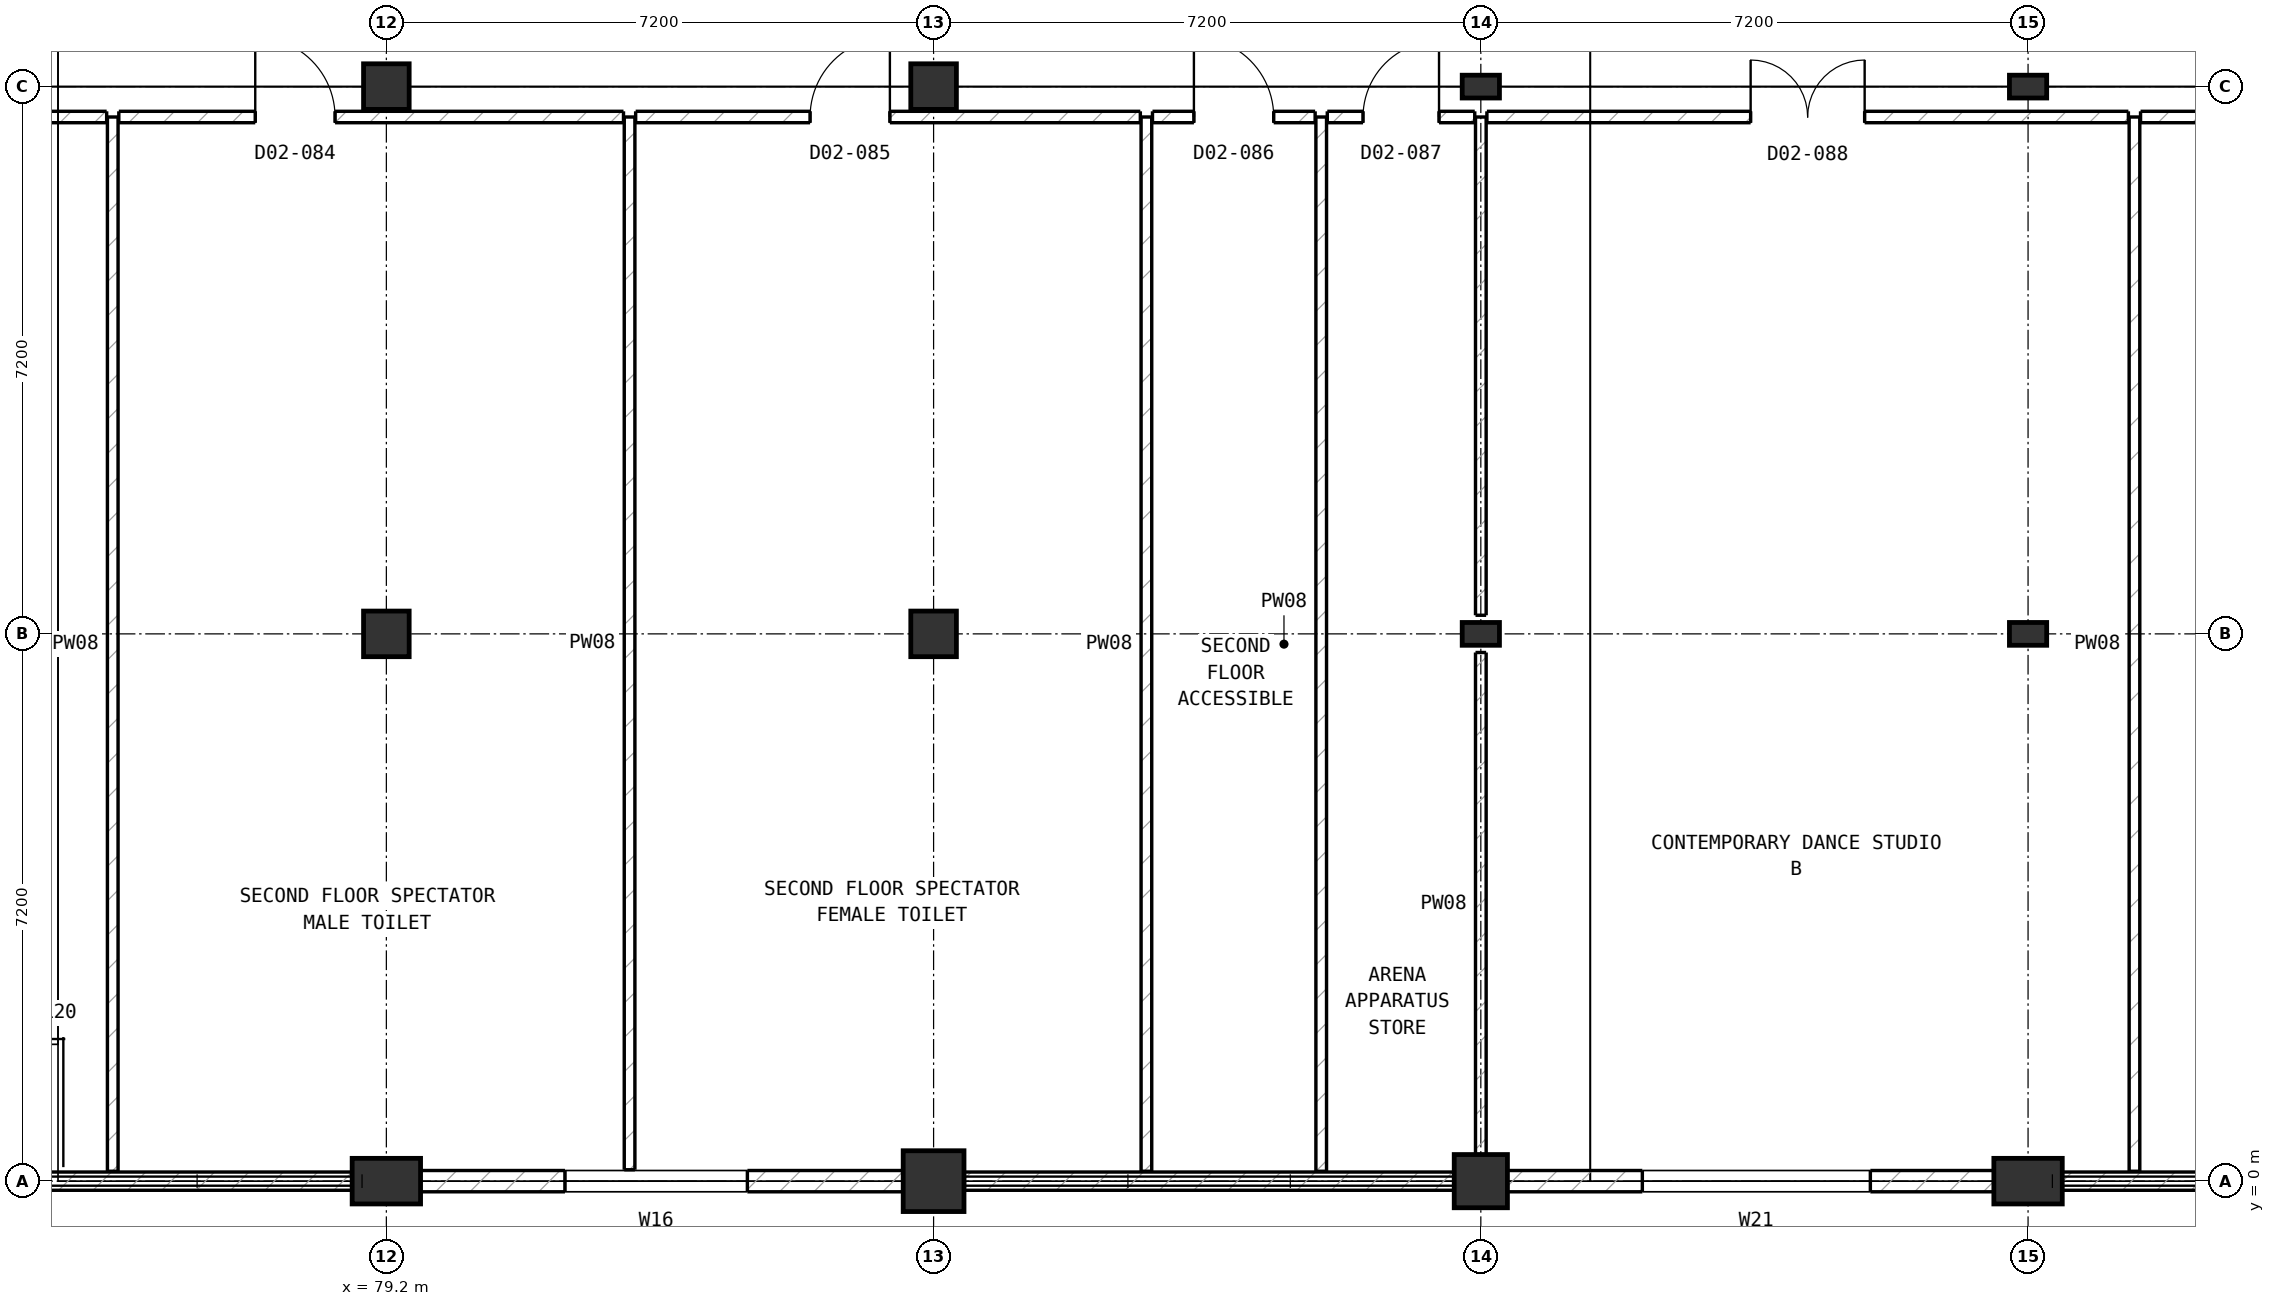
"""IFC4 building model, lengths in metres.
Left out: names, types, materials, properties, quantities, classifications, styles, units other than length and angle.
Written with IfcOpenShell. Run it as: python <this file> out.ifc"""

import sys

from ifc_helpers import new_model, si_unit, direction, frame, frame_2d, origin, origin_2d, place, context, subcontext, project, spatial, rectangle, i_section, extrude, element, fill, save


model = new_model("IFC4")
c1 = context("Model", 3, precision=1e-05, world=origin(), true_north=direction((0.0, 1.0)))
c2 = subcontext(c1, "Body", "Model", "MODEL_VIEW")
j1 = project(units=[si_unit("LENGTHUNIT", "METRE"), si_unit("PLANEANGLEUNIT", "RADIAN")], contexts=[c1])
p1 = place(None, origin())
s1 = spatial("IfcSite", under=j1, at=p1, CompositionType="ELEMENT")
p2 = place(p1, origin())
s2 = spatial("IfcBuilding", under=s1, at=p2, CompositionType="ELEMENT")
p3 = place(p2, frame((0.0, 0.0, 11.2)))
s3 = spatial("IfcBuildingStorey", under=s2, at=p3, CompositionType="ELEMENT", Elevation=11.2)
p4 = place(p3, frame((79.2, 0.0, 0.0), z_axis=(0.0, 0.0, 1.0), x_axis=(1.0, 0.0, 0.0)))
e1 = element("IfcColumn", 1, at=p4, inside=s3, PredefinedType="COLUMN", context=c2, shape_type="SweptSolid", body=[
    extrude(rectangle(XDim=0.6, YDim=0.9, at=origin_2d()), origin(), (0.0, 0.0, 1.0), 4.8),
])
for number, where, z_axis, x_axis in (
    (2, (79.2, 7.2, 0.0), (0.0, 0.0, 1.0), (1.0, 0.0, 0.0)),
    (3, (79.2, 14.4, 0.0), (0.0, 0.0, 1.0), (1.0, 0.0, 0.0)),
):
    element("IfcColumn", number, at=place(p3, frame(where, z_axis=z_axis, x_axis=x_axis)), inside=s3, PredefinedType="COLUMN", context=c2, shape_type="SweptSolid", body=[
        extrude(rectangle(XDim=0.6, YDim=0.6, at=origin_2d()), origin(), (0.0, 0.0, 1.0), 4.8),
    ])
p5 = place(p3, frame((86.4, 0.0, 0.0), z_axis=(0.0, 0.0, 1.0), x_axis=(1.0, 0.0, 0.0)))
e4 = element("IfcColumn", 4, at=p5, inside=s3, PredefinedType="COLUMN", context=c2, shape_type="SweptSolid", body=[
    extrude(rectangle(XDim=0.8, YDim=0.8, at=origin_2d()), origin(), (0.0, 0.0, 1.0), 4.8),
])
for number, where, z_axis, x_axis in (
    (5, (86.4, 7.2, 0.0), (0.0, 0.0, 1.0), (1.0, 0.0, 0.0)),
    (6, (86.4, 14.4, 0.0), (0.0, 0.0, 1.0), (1.0, 0.0, 0.0)),
):
    element("IfcColumn", number, at=place(p3, frame(where, z_axis=z_axis, x_axis=x_axis)), inside=s3, PredefinedType="COLUMN", context=c2, shape_type="SweptSolid", body=[
        extrude(rectangle(XDim=0.6, YDim=0.6, at=origin_2d()), origin(), (0.0, 0.0, 1.0), 4.8),
    ])
p6 = place(p3, frame((93.6, 0.0, 0.0), z_axis=(0.0, 0.0, 1.0), x_axis=(1.0, 0.0, 0.0)))
e7 = element("IfcColumn", 7, at=p6, inside=s3, PredefinedType="COLUMN", context=c2, shape_type="SweptSolid", body=[
    extrude(rectangle(XDim=0.7, YDim=0.7, at=origin_2d()), origin(), (0.0, 0.0, 1.0), 4.8),
])
for number, where, z_axis, x_axis in (
    (8, (93.6, 7.2, 0.0), (0.0, 0.0, 1.0), (1.0, 0.0, 0.0)),
    (9, (93.6, 14.4, 0.0), (0.0, 0.0, 1.0), (1.0, 0.0, 0.0)),
):
    element("IfcColumn", number, at=place(p3, frame(where, z_axis=z_axis, x_axis=x_axis)), inside=s3, PredefinedType="COLUMN", context=c2, shape_type="SweptSolid", body=[
        extrude(i_section(OverallWidth=0.3, OverallDepth=0.49, WebThickness=0.012, FlangeThickness=0.023, at=origin_2d()), origin(), (0.0, 0.0, 1.0), 4.8),
    ])
p7 = place(p3, frame((100.8, 0.0, 0.0), z_axis=(0.0, 0.0, 1.0), x_axis=(1.0, 0.0, 0.0)))
e10 = element("IfcColumn", 10, at=p7, inside=s3, PredefinedType="COLUMN", context=c2, shape_type="SweptSolid", body=[
    extrude(rectangle(XDim=0.6, YDim=0.9, at=origin_2d()), origin(), (0.0, 0.0, 1.0), 4.8),
])
for number, where, z_axis, x_axis in (
    (11, (100.8, 7.2, 0.0), (0.0, 0.0, 1.0), (1.0, 0.0, 0.0)),
    (12, (100.8, 14.4, 0.0), (0.0, 0.0, 1.0), (1.0, 0.0, 0.0)),
):
    element("IfcColumn", number, at=place(p3, frame(where, z_axis=z_axis, x_axis=x_axis)), inside=s3, PredefinedType="COLUMN", context=c2, shape_type="SweptSolid", body=[
        extrude(i_section(OverallWidth=0.3, OverallDepth=0.49, WebThickness=0.012, FlangeThickness=0.023, at=origin_2d()), origin(), (0.0, 0.0, 1.0), 4.8),
    ])
p8 = place(p3, frame((107.615, 0.0, 0.0), z_axis=(0.0, 0.0, 1.0), x_axis=(-1.0, 0.0, 0.0)))
e13 = element("IfcWall", 13, at=p8, inside=s3, PredefinedType="SOLIDWALL", context=c2, shape_type="SweptSolid", body=[
    extrude(rectangle(XDim=6.53, YDim=0.24, at=frame_2d((3.265, 0.0))), origin(), (0.0, 0.0, 1.0), 0.35),
])
p9 = place(p3, frame((100.515, 0.0, 0.0), z_axis=(0.0, 0.0, 1.0), x_axis=(-1.0, 0.0, 0.0)))
e14 = element("IfcWall", 14, at=p9, inside=s3, PredefinedType="SOLIDWALL", context=c2, shape_type="SweptSolid", body=[
    extrude(rectangle(XDim=6.58, YDim=0.28, at=frame_2d((3.29, 0.0))), origin(), (0.0, 0.0, 1.0), 4.185),
])
p10 = place(p9, frame((1.79, 0.0, 0.9)))
e15 = element("IfcOpeningElement", 15, at=p10, cuts=e14, PredefinedType="OPENING", context=c2, shape_type="SweptSolid", body=[
    extrude(rectangle(XDim=3.0, YDim=2.1, at=frame_2d((1.5, 1.05))), frame((0.0, 0.15, 0.0), z_axis=(0.0, -1.0, 0.0), x_axis=(1.0, 0.0, 0.0)), (0.0, 0.0, 1.0), 0.3),
])
p11 = place(p3, frame((93.265, 0.0, 0.0), z_axis=(0.0, 0.0, 1.0), x_axis=(-1.0, 0.0, 0.0)))
e16 = element("IfcWall", 16, at=p11, inside=s3, PredefinedType="SOLIDWALL", context=c2, shape_type="SweptSolid", body=[
    extrude(rectangle(XDim=6.48, YDim=0.24, at=frame_2d((3.24, 0.0))), origin(), (0.0, 0.0, 1.0), 0.35),
])
p12 = place(p3, frame((86.015, 0.0, 0.0), z_axis=(0.0, 0.0, 1.0), x_axis=(-1.0, 0.0, 0.0)))
e17 = element("IfcWall", 17, at=p12, inside=s3, PredefinedType="SOLIDWALL", context=c2, shape_type="SweptSolid", body=[
    extrude(rectangle(XDim=6.53, YDim=0.28, at=frame_2d((3.265, 0.0))), origin(), (0.0, 0.0, 1.0), 4.185),
])
p13 = place(p12, frame((2.065, 0.0, 0.9)))
e18 = element("IfcOpeningElement", 18, at=p13, cuts=e17, PredefinedType="OPENING", context=c2, shape_type="SweptSolid", body=[
    extrude(rectangle(XDim=2.4, YDim=2.1, at=frame_2d((1.2, 1.05))), frame((0.0, 0.15, 0.0), z_axis=(0.0, -1.0, 0.0), x_axis=(1.0, 0.0, 0.0)), (0.0, 0.0, 1.0), 0.3),
])
p14 = place(p3, frame((78.915, 0.0, 0.0), z_axis=(0.0, 0.0, 1.0), x_axis=(-1.0, 0.0, 0.0)))
e19 = element("IfcWall", 19, at=p14, inside=s3, PredefinedType="SOLIDWALL", context=c2, shape_type="SweptSolid", body=[
    extrude(rectangle(XDim=6.58, YDim=0.24, at=frame_2d((3.29, 0.0))), origin(), (0.0, 0.0, 1.0), 0.35),
])
p15 = place(p3, frame((75.6, 0.13, 0.0), z_axis=(0.0, 0.0, 1.0), x_axis=(0.0, 1.0, 0.0)))
e20 = element("IfcWall", 20, at=p15, inside=s3, PredefinedType="PARTITIONING", context=c2, shape_type="SweptSolid", body=[
    extrude(rectangle(XDim=13.87, YDim=0.14, at=frame_2d((6.935, 0.0))), origin(), (0.0, 0.0, 1.0), 4.51),
])
p16 = place(p3, frame((82.4, 0.15, 0.0), z_axis=(0.0, 0.0, 1.0), x_axis=(0.0, 1.0, 0.0)))
e21 = element("IfcWall", 21, at=p16, inside=s3, PredefinedType="PARTITIONING", context=c2, shape_type="SweptSolid", body=[
    extrude(rectangle(XDim=13.85, YDim=0.14, at=frame_2d((6.925, 0.0))), origin(), (0.0, 0.0, 1.0), 4.51),
])
for number, where, z_axis, x_axis in (
    (22, (89.2, 0.13, 0.0), (0.0, 0.0, 1.0), (0.0, 1.0, 0.0)),
    (23, (91.5, 0.13, 0.0), (0.0, 0.0, 1.0), (0.0, 1.0, 0.0)),
):
    element("IfcWall", number, at=place(p3, frame(where, z_axis=z_axis, x_axis=x_axis)), inside=s3, PredefinedType="PARTITIONING", context=c2, shape_type="SweptSolid", body=[
        extrude(rectangle(XDim=13.87, YDim=0.14, at=frame_2d((6.935, 0.0))), origin(), (0.0, 0.0, 1.0), 4.51),
    ])
p17 = place(p3, frame((93.6, 0.35, 0.0), z_axis=(0.0, 0.0, 1.0), x_axis=(0.0, 1.0, 0.0)))
e24 = element("IfcWall", 24, at=p17, inside=s3, PredefinedType="PARTITIONING", context=c2, shape_type="SweptSolid", body=[
    extrude(rectangle(XDim=6.605, YDim=0.14, at=frame_2d((3.302, 0.0))), origin(), (0.0, 0.0, 1.0), 3.99),
])
p18 = place(p3, frame((93.6, 7.445, 0.0), z_axis=(0.0, 0.0, 1.0), x_axis=(0.0, 1.0, 0.0)))
e25 = element("IfcWall", 25, at=p18, inside=s3, PredefinedType="PARTITIONING", context=c2, shape_type="SweptSolid", body=[
    extrude(rectangle(XDim=6.555, YDim=0.14, at=frame_2d((3.277, 0.0))), origin(), (0.0, 0.0, 1.0), 3.99),
])
p19 = place(p3, frame((102.2, 0.13, 0.0), z_axis=(0.0, 0.0, 1.0), x_axis=(0.0, 1.0, 0.0)))
e26 = element("IfcWall", 26, at=p19, inside=s3, PredefinedType="PARTITIONING", context=c2, shape_type="SweptSolid", body=[
    extrude(rectangle(XDim=13.87, YDim=0.14, at=frame_2d((6.935, 0.0))), origin(), (0.0, 0.0, 1.0), 4.49),
])
p20 = place(p3, frame((64.87, 14.0, 0.0), z_axis=(0.0, 0.0, 1.0), x_axis=(1.0, 0.0, 0.0)))
e27 = element("IfcWall", 27, at=p20, inside=s3, PredefinedType="PARTITIONING", context=c2, shape_type="SweptSolid", body=[
    extrude(rectangle(XDim=10.65, YDim=0.15, at=frame_2d((5.325, 0.0))), origin(), (0.0, 0.0, 1.0), 4.51),
])
p21 = place(p20, frame((4.8, 0.0, 0.0)))
e28 = element("IfcOpeningElement", 28, at=p21, cuts=e27, PredefinedType="OPENING", context=c2, shape_type="SweptSolid", body=[
    extrude(rectangle(XDim=1.05, YDim=2.15, at=frame_2d((0.525, 1.075))), frame((0.0, 0.085, 0.0), z_axis=(0.0, -1.0, 0.0), x_axis=(1.0, 0.0, 0.0)), (0.0, 0.0, 1.0), 0.17),
])
p22 = place(p3, frame((75.68, 14.0, 0.0), z_axis=(0.0, 0.0, 1.0), x_axis=(1.0, 0.0, 0.0)))
e29 = element("IfcWall", 29, at=p22, inside=s3, PredefinedType="PARTITIONING", context=c2, shape_type="SweptSolid", body=[
    extrude(rectangle(XDim=6.64, YDim=0.15, at=frame_2d((3.32, 0.0))), origin(), (0.0, 0.0, 1.0), 4.51),
])
p23 = place(p22, frame((1.795, 0.0, 0.0)))
e30 = element("IfcOpeningElement", 30, at=p23, cuts=e29, PredefinedType="OPENING", context=c2, shape_type="SweptSolid", body=[
    extrude(rectangle(XDim=1.05, YDim=2.15, at=frame_2d((0.525, 1.075))), frame((0.0, 0.085, 0.0), z_axis=(0.0, -1.0, 0.0), x_axis=(1.0, 0.0, 0.0)), (0.0, 0.0, 1.0), 0.17),
])
p24 = place(p3, frame((82.48, 14.0, 0.0), z_axis=(0.0, 0.0, 1.0), x_axis=(1.0, 0.0, 0.0)))
e31 = element("IfcWall", 31, at=p24, inside=s3, PredefinedType="PARTITIONING", context=c2, shape_type="SweptSolid", body=[
    extrude(rectangle(XDim=6.64, YDim=0.15, at=frame_2d((3.32, 0.0))), origin(), (0.0, 0.0, 1.0), 4.51),
])
p25 = place(p24, frame((2.295, 0.0, 0.0)))
e32 = element("IfcOpeningElement", 32, at=p25, cuts=e31, PredefinedType="OPENING", context=c2, shape_type="SweptSolid", body=[
    extrude(rectangle(XDim=1.05, YDim=2.15, at=frame_2d((0.525, 1.075))), frame((0.0, 0.085, 0.0), z_axis=(0.0, -1.0, 0.0), x_axis=(1.0, 0.0, 0.0)), (0.0, 0.0, 1.0), 0.17),
])
p26 = place(p3, frame((89.28, 14.0, 0.0), z_axis=(0.0, 0.0, 1.0), x_axis=(1.0, 0.0, 0.0)))
e33 = element("IfcWall", 33, at=p26, inside=s3, PredefinedType="PARTITIONING", context=c2, shape_type="SweptSolid", body=[
    extrude(rectangle(XDim=2.14, YDim=0.15, at=frame_2d((1.07, 0.0))), origin(), (0.0, 0.0, 1.0), 4.51),
])
p27 = place(p26, frame((0.545, 0.0, 0.0)))
e34 = element("IfcOpeningElement", 34, at=p27, cuts=e33, PredefinedType="OPENING", context=c2, shape_type="SweptSolid", body=[
    extrude(rectangle(XDim=1.05, YDim=2.15, at=frame_2d((0.525, 1.075))), frame((0.0, 0.085, 0.0), z_axis=(0.0, -1.0, 0.0), x_axis=(1.0, 0.0, 0.0)), (0.0, 0.0, 1.0), 0.17),
])
p28 = place(p3, frame((91.58, 14.0, 0.0), z_axis=(0.0, 0.0, 1.0), x_axis=(1.0, 0.0, 0.0)))
e35 = element("IfcWall", 35, at=p28, inside=s3, PredefinedType="PARTITIONING", context=c2, shape_type="SweptSolid", body=[
    extrude(rectangle(XDim=1.94, YDim=0.15, at=frame_2d((0.97, 0.0))), origin(), (0.0, 0.0, 1.0), 4.51),
])
p29 = place(p28, frame((0.47, 0.0, 0.0)))
e36 = element("IfcOpeningElement", 36, at=p29, cuts=e35, PredefinedType="OPENING", context=c2, shape_type="SweptSolid", body=[
    extrude(rectangle(XDim=1.0, YDim=2.15, at=frame_2d((0.5, 1.075))), frame((0.0, 0.085, 0.0), z_axis=(0.0, -1.0, 0.0), x_axis=(1.0, 0.0, 0.0)), (0.0, 0.0, 1.0), 0.17),
])
p30 = place(p3, frame((93.68, 14.0, 0.0), z_axis=(0.0, 0.0, 1.0), x_axis=(1.0, 0.0, 0.0)))
e37 = element("IfcWall", 37, at=p30, inside=s3, PredefinedType="PARTITIONING", context=c2, shape_type="SweptSolid", body=[
    extrude(rectangle(XDim=8.44, YDim=0.15, at=frame_2d((4.22, 0.0))), origin(), (0.0, 0.0, 1.0), 4.49),
])
p31 = place(p30, frame((3.47, 0.0, 0.0)))
e38 = element("IfcOpeningElement", 38, at=p31, cuts=e37, PredefinedType="OPENING", context=c2, shape_type="SweptSolid", body=[
    extrude(rectangle(XDim=1.5, YDim=2.2, at=frame_2d((0.75, 1.1))), frame((0.0, 0.085, 0.0), z_axis=(0.0, -1.0, 0.0), x_axis=(1.0, 0.0, 0.0)), (0.0, 0.0, 1.0), 0.17),
])
p32 = place(p3, frame((102.28, 14.0, 0.0), z_axis=(0.0, 0.0, 1.0), x_axis=(1.0, 0.0, 0.0)))
e39 = element("IfcWall", 39, at=p32, inside=s3, PredefinedType="PARTITIONING", context=c2, shape_type="SweptSolid", body=[
    extrude(rectangle(XDim=6.26, YDim=0.15, at=frame_2d((3.13, 0.0))), origin(), (0.0, 0.0, 1.0), 4.49),
])
p33 = place(p32, frame((2.28, 0.0, 0.0)))
e40 = element("IfcOpeningElement", 40, at=p33, cuts=e39, PredefinedType="OPENING", context=c2, shape_type="SweptSolid", body=[
    extrude(rectangle(XDim=1.7, YDim=2.3, at=frame_2d((0.85, 1.15))), frame((0.0, 0.085, 0.0), z_axis=(0.0, -1.0, 0.0), x_axis=(1.0, 0.0, 0.0)), (0.0, 0.0, 1.0), 0.17),
])
p34 = place(p10, origin())
e41 = element("IfcWindow", 41, at=p34, inside=s3, PartitioningType="SINGLE_PANEL", PredefinedType="WINDOW", context=c2, shape_type="SweptSolid", body=[
    extrude(rectangle(XDim=3.0, YDim=2.1, at=frame_2d((1.5, 1.05))), frame((0.0, 0.03, 0.0), z_axis=(0.0, -1.0, 0.0), x_axis=(1.0, 0.0, 0.0)), (0.0, 0.0, 1.0), 0.06),
])
fill(e15, e41)
p35 = place(p13, origin())
e42 = element("IfcWindow", 42, at=p35, inside=s3, PartitioningType="SINGLE_PANEL", PredefinedType="WINDOW", context=c2, shape_type="SweptSolid", body=[
    extrude(rectangle(XDim=2.4, YDim=2.1, at=frame_2d((1.2, 1.05))), frame((0.0, 0.03, 0.0), z_axis=(0.0, -1.0, 0.0), x_axis=(1.0, 0.0, 0.0)), (0.0, 0.0, 1.0), 0.06),
])
fill(e18, e42)
p36 = place(p23, origin())
e43 = element("IfcDoor", 43, at=p36, inside=s3, OperationType="SINGLE_SWING_LEFT", PredefinedType="DOOR", context=c2, shape_type="SweptSolid", body=[
    extrude(rectangle(XDim=1.05, YDim=2.15, at=frame_2d((0.525, 1.075))), frame((0.0, 0.025, 0.0), z_axis=(0.0, -1.0, 0.0), x_axis=(1.0, 0.0, 0.0)), (0.0, 0.0, 1.0), 0.05),
])
fill(e30, e43)
p37 = place(p25, origin())
e44 = element("IfcDoor", 44, at=p37, inside=s3, OperationType="SINGLE_SWING_RIGHT", PredefinedType="DOOR", context=c2, shape_type="SweptSolid", body=[
    extrude(rectangle(XDim=1.05, YDim=2.15, at=frame_2d((0.525, 1.075))), frame((0.0, 0.025, 0.0), z_axis=(0.0, -1.0, 0.0), x_axis=(1.0, 0.0, 0.0)), (0.0, 0.0, 1.0), 0.05),
])
fill(e32, e44)
p38 = place(p27, origin())
e45 = element("IfcDoor", 45, at=p38, inside=s3, OperationType="SINGLE_SWING_LEFT", PredefinedType="DOOR", context=c2, shape_type="SweptSolid", body=[
    extrude(rectangle(XDim=1.05, YDim=2.15, at=frame_2d((0.525, 1.075))), frame((0.0, 0.025, 0.0), z_axis=(0.0, -1.0, 0.0), x_axis=(1.0, 0.0, 0.0)), (0.0, 0.0, 1.0), 0.05),
])
fill(e34, e45)
p39 = place(p29, origin())
e46 = element("IfcDoor", 46, at=p39, inside=s3, OperationType="SINGLE_SWING_RIGHT", PredefinedType="DOOR", context=c2, shape_type="SweptSolid", body=[
    extrude(rectangle(XDim=1.0, YDim=2.15, at=frame_2d((0.5, 1.075))), frame((0.0, 0.025, 0.0), z_axis=(0.0, -1.0, 0.0), x_axis=(1.0, 0.0, 0.0)), (0.0, 0.0, 1.0), 0.05),
])
fill(e36, e46)
p40 = place(p31, origin())
e47 = element("IfcDoor", 47, at=p40, inside=s3, OperationType="DOUBLE_DOOR_SINGLE_SWING", PredefinedType="DOOR", context=c2, shape_type="SweptSolid", body=[
    extrude(rectangle(XDim=1.5, YDim=2.2, at=frame_2d((0.75, 1.1))), frame((0.0, 0.025, 0.0), z_axis=(0.0, -1.0, 0.0), x_axis=(1.0, 0.0, 0.0)), (0.0, 0.0, 1.0), 0.05),
])
fill(e38, e47)
save(model, sys.argv[1])
